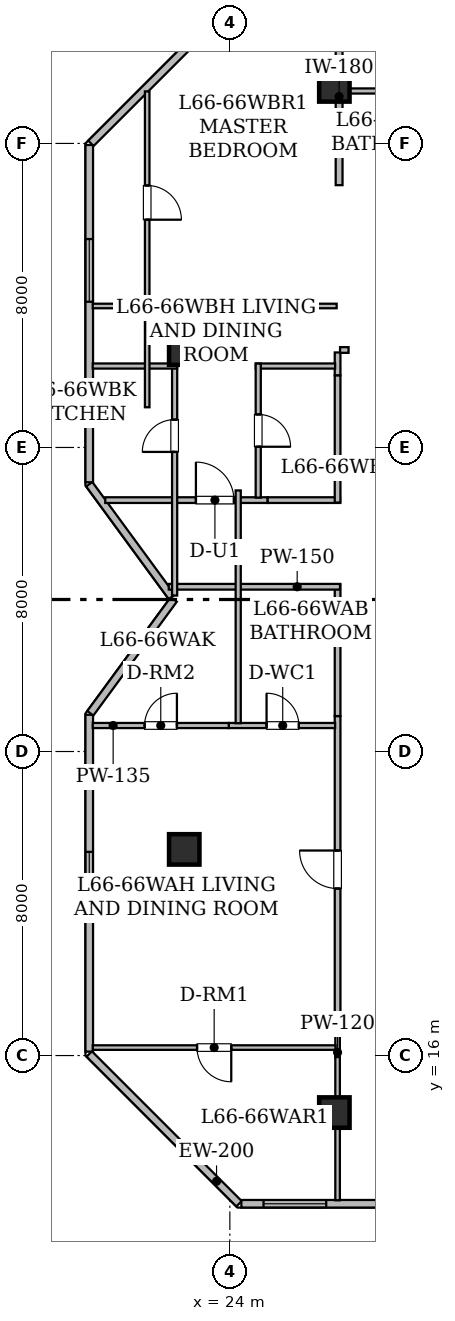
"""IFC4 building model, lengths in metres.
Left out: names, types, materials, properties, quantities, classifications, styles, units other than length and angle.
Written with IfcOpenShell. Run it as: python <this file> out.ifc"""

import sys

from ifc_helpers import new_model, si_unit, direction, frame, frame_2d, origin, origin_2d, place, context, subcontext, project, spatial, rectangle, hollow_rectangle, extrude, element, fill, save


model = new_model("IFC4")
c1 = context("Model", 3, precision=1e-05, world=origin(), true_north=direction((0.0, 1.0)))
c2 = subcontext(c1, "Body", "Model", "MODEL_VIEW")
j1 = project(units=[si_unit("LENGTHUNIT", "METRE"), si_unit("PLANEANGLEUNIT", "RADIAN")], contexts=[c1])
p1 = place(None, origin())
s1 = spatial("IfcSite", under=j1, at=p1, CompositionType="ELEMENT")
p2 = place(p1, origin())
s2 = spatial("IfcBuilding", under=s1, at=p2, CompositionType="ELEMENT")
p3 = place(p2, frame((0.0, 0.0, 257.35)))
s3 = spatial("IfcBuildingStorey", under=s2, at=p3, CompositionType="ELEMENT", Elevation=257.35)
for number, where, z_axis, x_axis in (
    (1, (26.75, 14.5, 0.0), (0.0, 0.0, 1.0), (1.0, 0.0, 0.0)),
    (2, (26.75, 41.5, 0.0), (0.0, 0.0, 1.0), (1.0, 0.0, 0.0)),
    (3, (22.8, 21.425, 0.0), (0.0, 0.0, 1.0), (1.0, 0.0, 0.0)),
    (4, (22.8, 34.575, 0.0), (0.0, 0.0, 1.0), (1.0, 0.0, 0.0)),
):
    element("IfcColumn", number, at=place(p3, frame(where, z_axis=z_axis, x_axis=x_axis)), inside=s3, PredefinedType="COLUMN", context=c2, shape_type="SweptSolid", body=[
        extrude(hollow_rectangle(XDim=0.8, YDim=0.8, WallThickness=0.04, at=origin_2d()), origin(), (0.0, 0.0, 1.0), 3.65),
    ])
p4 = place(p3, frame((24.241, 12.1, 0.0), z_axis=(0.0, 0.0, 1.0), x_axis=(-0.707106781187, 0.707106781187, 0.0)))
e5 = element("IfcWall", 5, at=p4, inside=s3, PredefinedType="STANDARD", context=c2, shape_type="SweptSolid", body=[
    extrude(rectangle(XDim=5.573, YDim=0.2, at=frame_2d((2.787, 0.0))), origin(), (0.0, 0.0, 1.0), 3.43),
])
p5 = place(p3, frame((20.3, 16.104, 0.0), z_axis=(0.0, 0.0, 1.0), x_axis=(0.0, 1.0, 0.0)))
e6 = element("IfcWall", 6, at=p5, inside=s3, PredefinedType="STANDARD", context=c2, shape_type="SweptSolid", body=[
    extrude(rectangle(XDim=8.863, YDim=0.2, at=frame_2d((4.432, 0.0))), origin(), (0.0, 0.0, 1.0), 3.43),
])
p6 = place(p5, frame((3.606, 0.0, 0.85)))
e7 = element("IfcOpeningElement", 7, at=p6, cuts=e6, PredefinedType="OPENING", context=c2, shape_type="SweptSolid", body=[
    extrude(rectangle(XDim=1.65, YDim=1.55, at=frame_2d((0.825, 0.775))), frame((0.0, 0.11, 0.0), z_axis=(0.0, -1.0, 0.0), x_axis=(1.0, 0.0, 0.0)), (0.0, 0.0, 1.0), 0.22),
])
p7 = place(p3, frame((20.329, 25.007, 0.0), z_axis=(0.0, 0.0, 1.0), x_axis=(0.591366515379, 0.806402904564, 0.0)))
e8 = element("IfcWall", 8, at=p7, inside=s3, PredefinedType="STANDARD", context=c2, shape_type="SweptSolid", body=[
    extrude(rectangle(XDim=3.711, YDim=0.2, at=frame_2d((1.856, 0.0))), origin(), (0.0, 0.0, 1.0), 3.43),
])
p8 = place(p3, frame((22.473, 28.069, 0.0), z_axis=(0.0, 0.0, 1.0), x_axis=(-0.591248456881, 0.80648946815, 0.0)))
e9 = element("IfcWall", 9, at=p8, inside=s3, PredefinedType="STANDARD", context=c2, shape_type="SweptSolid", body=[
    extrude(rectangle(XDim=3.675, YDim=0.2, at=frame_2d((1.837, 0.0))), origin(), (0.0, 0.0, 1.0), 3.43),
])
p9 = place(p3, frame((20.3, 31.084, 0.0), z_axis=(0.0, 0.0, 1.0), x_axis=(0.0, 1.0, 0.0)))
e10 = element("IfcWall", 10, at=p9, inside=s3, PredefinedType="STANDARD", context=c2, shape_type="SweptSolid", body=[
    extrude(rectangle(XDim=8.875, YDim=0.2, at=frame_2d((4.438, 0.0))), origin(), (0.0, 0.0, 1.0), 3.43),
])
p10 = place(p9, frame((4.75, 0.0, 0.85)))
e11 = element("IfcOpeningElement", 11, at=p10, cuts=e10, PredefinedType="OPENING", context=c2, shape_type="SweptSolid", body=[
    extrude(rectangle(XDim=1.65, YDim=1.55, at=frame_2d((0.825, 0.775))), frame((0.0, 0.11, 0.0), z_axis=(0.0, -1.0, 0.0), x_axis=(1.0, 0.0, 0.0)), (0.0, 0.0, 1.0), 0.22),
])
p11 = place(p3, frame((20.344, 40.003, 0.0), z_axis=(0.0, 0.0, 1.0), x_axis=(0.707106781187, 0.707106781187, 0.0)))
e12 = element("IfcWall", 12, at=p11, inside=s3, PredefinedType="STANDARD", context=c2, shape_type="SweptSolid", body=[
    extrude(rectangle(XDim=5.511, YDim=0.2, at=frame_2d((2.756, 0.0))), origin(), (0.0, 0.0, 1.0), 3.43),
])
p12 = place(p3, frame((65.696, 12.1, 0.0), z_axis=(0.0, 0.0, 1.0), x_axis=(-1.0, 0.0, 0.0)))
e13 = element("IfcWall", 13, at=p12, inside=s3, PredefinedType="STANDARD", context=c2, shape_type="SweptSolid", body=[
    extrude(rectangle(XDim=41.393, YDim=0.2, at=frame_2d((20.697, 0.0))), origin(), (0.0, 0.0, 1.0), 3.43),
])
p13 = place(p12, frame((33.821, 0.0, 0.85)))
e14 = element("IfcOpeningElement", 14, at=p13, cuts=e13, PredefinedType="OPENING", context=c2, shape_type="SweptSolid", body=[
    extrude(rectangle(XDim=1.65, YDim=1.55, at=frame_2d((0.825, 0.775))), frame((0.0, 0.11, 0.0), z_axis=(0.0, -1.0, 0.0), x_axis=(1.0, 0.0, 0.0)), (0.0, 0.0, 1.0), 0.22),
])
p14 = place(p12, frame((39.16, 0.0, 0.85)))
e15 = element("IfcOpeningElement", 15, at=p14, cuts=e13, PredefinedType="OPENING", context=c2, shape_type="SweptSolid", body=[
    extrude(rectangle(XDim=1.65, YDim=1.55, at=frame_2d((0.825, 0.775))), frame((0.0, 0.11, 0.0), z_axis=(0.0, -1.0, 0.0), x_axis=(1.0, 0.0, 0.0)), (0.0, 0.0, 1.0), 0.22),
])
p15 = place(p12, frame((17.006, 0.0, 0.8)))
e16 = element("IfcOpeningElement", 16, at=p15, cuts=e13, PredefinedType="OPENING", context=c2, shape_type="SweptSolid", body=[
    extrude(rectangle(XDim=1.2, YDim=1.5, at=frame_2d((0.6, 0.75))), frame((0.0, 0.11, 0.0), z_axis=(0.0, -1.0, 0.0), x_axis=(1.0, 0.0, 0.0)), (0.0, 0.0, 1.0), 0.22),
])
p16 = place(p12, frame((20.411, 0.0, 0.85)))
e17 = element("IfcOpeningElement", 17, at=p16, cuts=e13, PredefinedType="OPENING", context=c2, shape_type="SweptSolid", body=[
    extrude(rectangle(XDim=1.65, YDim=1.55, at=frame_2d((0.825, 0.775))), frame((0.0, 0.11, 0.0), z_axis=(0.0, -1.0, 0.0), x_axis=(1.0, 0.0, 0.0)), (0.0, 0.0, 1.0), 0.22),
])
p17 = place(p12, frame((13.151, 0.0, 0.85)))
e18 = element("IfcOpeningElement", 18, at=p17, cuts=e13, PredefinedType="OPENING", context=c2, shape_type="SweptSolid", body=[
    extrude(rectangle(XDim=1.65, YDim=1.55, at=frame_2d((0.825, 0.775))), frame((0.0, 0.11, 0.0), z_axis=(0.0, -1.0, 0.0), x_axis=(1.0, 0.0, 0.0)), (0.0, 0.0, 1.0), 0.22),
])
p18 = place(p12, frame((2.936, 0.0, 0.8)))
e19 = element("IfcOpeningElement", 19, at=p18, cuts=e13, PredefinedType="OPENING", context=c2, shape_type="SweptSolid", body=[
    extrude(rectangle(XDim=1.2, YDim=1.5, at=frame_2d((0.6, 0.75))), frame((0.0, 0.11, 0.0), z_axis=(0.0, -1.0, 0.0), x_axis=(1.0, 0.0, 0.0)), (0.0, 0.0, 1.0), 0.22),
])
p19 = place(p12, frame((6.901, 0.0, 0.85)))
e20 = element("IfcOpeningElement", 20, at=p19, cuts=e13, PredefinedType="OPENING", context=c2, shape_type="SweptSolid", body=[
    extrude(rectangle(XDim=1.65, YDim=1.55, at=frame_2d((0.825, 0.775))), frame((0.0, 0.11, 0.0), z_axis=(0.0, -1.0, 0.0), x_axis=(1.0, 0.0, 0.0)), (0.0, 0.0, 1.0), 0.22),
])
p20 = place(p12, frame((0.693, 0.0, 0.85)))
e21 = element("IfcOpeningElement", 21, at=p20, cuts=e13, PredefinedType="OPENING", context=c2, shape_type="SweptSolid", body=[
    extrude(rectangle(XDim=1.65, YDim=1.55, at=frame_2d((0.825, 0.775))), frame((0.0, 0.11, 0.0), z_axis=(0.0, -1.0, 0.0), x_axis=(1.0, 0.0, 0.0)), (0.0, 0.0, 1.0), 0.22),
])
p21 = place(p3, frame((35.514, 16.835, 0.0), z_axis=(0.0, 0.0, 1.0), x_axis=(-1.0, 0.0, 0.0)))
e22 = element("IfcWall", 22, at=p21, inside=s3, PredefinedType="STANDARD", context=c2, shape_type="SweptSolid", body=[
    extrude(rectangle(XDim=8.614, YDim=0.15, at=frame_2d((4.307, 0.0))), origin(), (0.0, 0.0, 1.0), 2.725),
])
p22 = place(p21, frame((3.753, 0.0, 0.0)))
e23 = element("IfcOpeningElement", 23, at=p22, cuts=e22, PredefinedType="OPENING", context=c2, shape_type="SweptSolid", body=[
    extrude(rectangle(XDim=1.15, YDim=2.2, at=frame_2d((0.575, 1.1))), frame((0.0, 0.085, 0.0), z_axis=(0.0, -1.0, 0.0), x_axis=(1.0, 0.0, 0.0)), (0.0, 0.0, 1.0), 0.17),
])
p23 = place(p3, frame((26.835, 16.9, 0.0), z_axis=(0.0, 0.0, 1.0), x_axis=(0.0, 1.0, 0.0)))
e24 = element("IfcWall", 24, at=p23, inside=s3, PredefinedType="STANDARD", context=c2, shape_type="SweptSolid", body=[
    extrude(rectangle(XDim=8.033, YDim=0.15, at=frame_2d((4.017, 0.0))), origin(), (0.0, 0.0, 1.0), 2.725),
])
p24 = place(p23, frame((3.495, 0.0, 0.0)))
e25 = element("IfcOpeningElement", 25, at=p24, cuts=e24, PredefinedType="OPENING", context=c2, shape_type="SweptSolid", body=[
    extrude(rectangle(XDim=1.0, YDim=2.15, at=frame_2d((0.5, 1.075))), frame((0.0, 0.085, 0.0), z_axis=(0.0, -1.0, 0.0), x_axis=(1.0, 0.0, 0.0)), (0.0, 0.0, 1.0), 0.17),
])
p25 = place(p3, frame((26.835, 24.933, 0.0), z_axis=(0.0, 0.0, 1.0), x_axis=(0.0, 1.0, 0.0)))
e26 = element("IfcWall", 26, at=p25, inside=s3, PredefinedType="STANDARD", context=c2, shape_type="SweptSolid", body=[
    extrude(rectangle(XDim=3.467, YDim=0.15, at=frame_2d((1.733, 0.0))), origin(), (0.0, 0.0, 1.0), 3.43),
])
p26 = place(p3, frame((26.898, 28.335, 0.0), z_axis=(0.0, 0.0, 1.0), x_axis=(-1.0, 0.0, 0.0)))
e27 = element("IfcWall", 27, at=p26, inside=s3, PredefinedType="STANDARD", context=c2, shape_type="SweptSolid", body=[
    extrude(rectangle(XDim=4.506, YDim=0.15, at=frame_2d((2.253, 0.0))), origin(), (0.0, 0.0, 1.0), 2.887),
])
p27 = place(p3, frame((20.721, 30.615, 0.0), z_axis=(0.0, 0.0, 1.0), x_axis=(1.0, 0.0, 0.0)))
e28 = element("IfcWall", 28, at=p27, inside=s3, PredefinedType="STANDARD", context=c2, shape_type="SweptSolid", body=[
    extrude(rectangle(XDim=4.275, YDim=0.15, at=frame_2d((2.138, 0.0))), origin(), (0.0, 0.0, 1.0), 2.887),
])
p28 = place(p27, frame((2.386, 0.0, 0.0)))
e29 = element("IfcOpeningElement", 29, at=p28, cuts=e28, PredefinedType="OPENING", context=c2, shape_type="SweptSolid", body=[
    extrude(rectangle(XDim=1.0, YDim=2.15, at=frame_2d((0.5, 1.075))), frame((0.0, 0.085, 0.0), z_axis=(0.0, -1.0, 0.0), x_axis=(1.0, 0.0, 0.0)), (0.0, 0.0, 1.0), 0.17),
])
p29 = place(p3, frame((26.835, 33.894, 0.0), z_axis=(0.0, 0.0, 1.0), x_axis=(0.0, 1.0, 0.0)))
e30 = element("IfcWall", 30, at=p29, inside=s3, PredefinedType="STANDARD", context=c2, shape_type="SweptSolid", body=[
    extrude(rectangle(XDim=0.606, YDim=0.15, at=frame_2d((0.303, 0.0))), origin(), (0.0, 0.0, 1.0), 2.687),
])
p30 = place(p3, frame((26.9, 34.565, 0.0), z_axis=(0.0, 0.0, 1.0), x_axis=(1.0, 0.0, 0.0)))
e31 = element("IfcWall", 31, at=p30, inside=s3, PredefinedType="STANDARD", context=c2, shape_type="SweptSolid", body=[
    extrude(rectangle(XDim=0.224, YDim=0.15, at=frame_2d((0.112, 0.0))), origin(), (0.0, 0.0, 1.0), 2.687),
])
p31 = place(p3, frame((24.996, 30.615, 0.0), z_axis=(0.0, 0.0, 1.0), x_axis=(1.0, 0.0, 0.0)))
e32 = element("IfcWall", 32, at=p31, inside=s3, PredefinedType="STANDARD", context=c2, shape_type="SweptSolid", body=[
    extrude(rectangle(XDim=1.904, YDim=0.15, at=frame_2d((0.952, 0.0))), origin(), (0.0, 0.0, 1.0), 3.43),
])
p32 = place(p3, frame((26.835, 30.552, 0.0), z_axis=(0.0, 0.0, 1.0), x_axis=(0.0, 1.0, 0.0)))
e33 = element("IfcWall", 33, at=p32, inside=s3, PredefinedType="STANDARD", context=c2, shape_type="SweptSolid", body=[
    extrude(rectangle(XDim=3.342, YDim=0.15, at=frame_2d((1.671, 0.0))), origin(), (0.0, 0.0, 1.0), 2.687),
])
p33 = place(p3, frame((26.835, 15.961, 0.0), z_axis=(0.0, 0.0, 1.0), x_axis=(0.0, 1.0, 0.0)))
e34 = element("IfcWall", 34, at=p33, inside=s3, PredefinedType="PARTITIONING", context=c2, shape_type="SweptSolid", body=[
    extrude(rectangle(XDim=0.809, YDim=0.12, at=frame_2d((0.405, 0.0))), origin(), (0.0, 0.0, 1.0), 3.43),
])
p34 = place(p3, frame((26.835, 12.192, 0.0), z_axis=(0.0, 0.0, 1.0), x_axis=(0.0, 1.0, 0.0)))
e35 = element("IfcWall", 35, at=p34, inside=s3, PredefinedType="PARTITIONING", context=c2, shape_type="SweptSolid", body=[
    extrude(rectangle(XDim=3.769, YDim=0.12, at=frame_2d((1.885, 0.0))), origin(), (0.0, 0.0, 1.0), 2.725),
])
p35 = place(p3, frame((23.971, 24.684, 0.0), z_axis=(0.0, 0.0, 1.0), x_axis=(1.0, 0.0, 0.0)))
e36 = element("IfcWall", 36, at=p35, inside=s3, PredefinedType="PARTITIONING", context=c2, shape_type="SweptSolid", body=[
    extrude(rectangle(XDim=2.799, YDim=0.135, at=frame_2d((1.399, 0.0))), origin(), (0.0, 0.0, 1.0), 3.43),
])
p36 = place(p35, frame((0.995, 0.0, 0.0)))
e37 = element("IfcOpeningElement", 37, at=p36, cuts=e36, PredefinedType="OPENING", context=c2, shape_type="SweptSolid", body=[
    extrude(rectangle(XDim=0.85, YDim=2.1, at=frame_2d((0.425, 1.05))), frame((0.0, 0.077, 0.0), z_axis=(0.0, -1.0, 0.0), x_axis=(1.0, 0.0, 0.0)), (0.0, 0.0, 1.0), 0.155),
])
p37 = place(p3, frame((20.392, 24.684, 0.0), z_axis=(0.0, 0.0, 1.0), x_axis=(1.0, 0.0, 0.0)))
e38 = element("IfcWall", 38, at=p37, inside=s3, PredefinedType="PARTITIONING", context=c2, shape_type="SweptSolid", body=[
    extrude(rectangle(XDim=3.579, YDim=0.135, at=frame_2d((1.79, 0.0))), origin(), (0.0, 0.0, 1.0), 2.887),
])
p38 = place(p37, frame((1.365, 0.0, 0.0)))
e39 = element("IfcOpeningElement", 39, at=p38, cuts=e38, PredefinedType="OPENING", context=c2, shape_type="SweptSolid", body=[
    extrude(rectangle(XDim=0.85, YDim=2.1, at=frame_2d((0.425, 1.05))), frame((0.0, 0.077, 0.0), z_axis=(0.0, -1.0, 0.0), x_axis=(1.0, 0.0, 0.0)), (0.0, 0.0, 1.0), 0.155),
])
p39 = place(p3, frame((26.781, 16.21, 0.0), z_axis=(0.0, 0.0, 1.0), x_axis=(-1.0, 0.0, 0.0)))
e40 = element("IfcWall", 40, at=p39, inside=s3, PredefinedType="PARTITIONING", context=c2, shape_type="SweptSolid", body=[
    extrude(rectangle(XDim=6.389, YDim=0.12, at=frame_2d((3.194, 0.0))), origin(), (0.0, 0.0, 1.0), 2.887),
])
p40 = place(p39, frame((2.744, 0.0, 0.0)))
e41 = element("IfcOpeningElement", 41, at=p40, cuts=e40, PredefinedType="OPENING", context=c2, shape_type="SweptSolid", body=[
    extrude(rectangle(XDim=0.9, YDim=2.1, at=frame_2d((0.45, 1.05))), frame((0.0, 0.07, 0.0), z_axis=(0.0, -1.0, 0.0), x_axis=(1.0, 0.0, 0.0)), (0.0, 0.0, 1.0), 0.14),
])
p41 = place(p3, frame((24.22, 24.745, 0.0), z_axis=(0.0, 0.0, 1.0), x_axis=(0.0, 1.0, 0.0)))
e42 = element("IfcWall", 42, at=p41, inside=s3, PredefinedType="PARTITIONING", context=c2, shape_type="SweptSolid", body=[
    extrude(rectangle(XDim=6.125, YDim=0.135, at=frame_2d((3.062, 0.0))), origin(), (0.0, 0.0, 1.0), 3.43),
])
p42 = place(p3, frame((26.77, 34.143, 0.0), z_axis=(0.0, 0.0, 1.0), x_axis=(-1.0, 0.0, 0.0)))
e43 = element("IfcWall", 43, at=p42, inside=s3, PredefinedType="PARTITIONING", context=c2, shape_type="SweptSolid", body=[
    extrude(rectangle(XDim=2.088, YDim=0.135, at=frame_2d((1.044, 0.0))), origin(), (0.0, 0.0, 1.0), 2.687),
])
p43 = place(p3, frame((24.747, 34.208, 0.0), z_axis=(0.0, 0.0, 1.0), x_axis=(0.0, -1.0, 0.0)))
e44 = element("IfcWall", 44, at=p43, inside=s3, PredefinedType="PARTITIONING", context=c2, shape_type="SweptSolid", body=[
    extrude(rectangle(XDim=3.528, YDim=0.135, at=frame_2d((1.764, 0.0))), origin(), (0.0, 0.0, 1.0), 2.687),
])
p44 = place(p43, frame((1.339, 0.0, 0.0)))
e45 = element("IfcOpeningElement", 45, at=p44, cuts=e44, PredefinedType="OPENING", context=c2, shape_type="SweptSolid", body=[
    extrude(rectangle(XDim=0.85, YDim=2.1, at=frame_2d((0.425, 1.05))), frame((0.0, 0.077, 0.0), z_axis=(0.0, -1.0, 0.0), x_axis=(1.0, 0.0, 0.0)), (0.0, 0.0, 1.0), 0.155),
])
p45 = place(p3, frame((22.547, 28.104, 0.0), z_axis=(0.0, 0.0, 1.0), x_axis=(0.0, 1.0, 0.0)))
e46 = element("IfcWall", 46, at=p45, inside=s3, PredefinedType="PARTITIONING", context=c2, shape_type="SweptSolid", body=[
    extrude(rectangle(XDim=6.104, YDim=0.135, at=frame_2d((3.052, 0.0))), origin(), (0.0, 0.0, 1.0), 2.687),
])
p46 = place(p45, frame((3.779, 0.0, 0.0)))
e47 = element("IfcOpeningElement", 47, at=p46, cuts=e46, PredefinedType="OPENING", context=c2, shape_type="SweptSolid", body=[
    extrude(rectangle(XDim=0.85, YDim=2.1, at=frame_2d((0.425, 1.05))), frame((0.0, 0.077, 0.0), z_axis=(0.0, -1.0, 0.0), x_axis=(1.0, 0.0, 0.0)), (0.0, 0.0, 1.0), 0.155),
])
p47 = place(p3, frame((22.612, 34.143, 0.0), z_axis=(0.0, 0.0, 1.0), x_axis=(-1.0, 0.0, 0.0)))
e48 = element("IfcWall", 48, at=p47, inside=s3, PredefinedType="PARTITIONING", context=c2, shape_type="SweptSolid", body=[
    extrude(rectangle(XDim=2.22, YDim=0.135, at=frame_2d((1.11, 0.0))), origin(), (0.0, 0.0, 1.0), 2.687),
])
p48 = place(p3, frame((21.825, 41.369, 0.0), z_axis=(0.0, 0.0, 1.0), x_axis=(0.0, -1.0, 0.0)))
e49 = element("IfcWall", 49, at=p48, inside=s3, PredefinedType="PARTITIONING", context=c2, shape_type="SweptSolid", body=[
    extrude(rectangle(XDim=8.311, YDim=0.12, at=frame_2d((4.155, 0.0))), origin(), (0.0, 0.0, 1.0), 2.687),
])
p49 = place(p48, frame((2.476, 0.0, 0.0)))
e50 = element("IfcOpeningElement", 50, at=p49, cuts=e49, PredefinedType="OPENING", context=c2, shape_type="SweptSolid", body=[
    extrude(rectangle(XDim=0.9, YDim=2.1, at=frame_2d((0.45, 1.05))), frame((0.0, 0.07, 0.0), z_axis=(0.0, -1.0, 0.0), x_axis=(1.0, 0.0, 0.0)), (0.0, 0.0, 1.0), 0.14),
])
p50 = place(p3, frame((20.392, 35.723, 0.0), z_axis=(0.0, 0.0, 1.0), x_axis=(1.0, 0.0, 0.0)))
e51 = element("IfcWall", 51, at=p50, inside=s3, PredefinedType="PARTITIONING", context=c2, shape_type="SweptSolid", body=[
    extrude(rectangle(XDim=6.418, YDim=0.12, at=frame_2d((3.209, 0.0))), origin(), (0.0, 0.0, 1.0), 2.725),
])
p51 = place(p3, frame((26.875, 41.643, 0.0), z_axis=(0.0, 0.0, 1.0), x_axis=(0.0, -1.0, 0.0)))
e52 = element("IfcWall", 52, at=p51, inside=s3, PredefinedType="STANDARD", context=c2, shape_type="SweptSolid", body=[
    extrude(rectangle(XDim=2.741, YDim=0.18, at=frame_2d((1.371, 0.0))), origin(), (0.0, 0.0, 1.0), 2.725),
])
p52 = place(p3, frame((26.875, 43.808, 0.0), z_axis=(0.0, 0.0, 1.0), x_axis=(0.0, -1.0, 0.0)))
e53 = element("IfcWall", 53, at=p52, inside=s3, PredefinedType="STANDARD", context=c2, shape_type="SweptSolid", body=[
    extrude(rectangle(XDim=2.165, YDim=0.18, at=frame_2d((1.083, 0.0))), origin(), (0.0, 0.0, 1.0), 2.725),
])
p53 = place(p3, frame((26.957, 41.38, 0.0), z_axis=(0.0, 0.0, 1.0), x_axis=(1.0, 0.0, 0.0)))
e54 = element("IfcWall", 54, at=p53, inside=s3, PredefinedType="PARTITIONING", context=c2, shape_type="SweptSolid", body=[
    extrude(rectangle(XDim=3.982, YDim=0.135, at=frame_2d((1.991, 0.0))), origin(), (0.0, 0.0, 1.0), 2.725),
])
p54 = place(p6, origin())
e55 = element("IfcWindow", 55, at=p54, inside=s3, PartitioningType="SINGLE_PANEL", PredefinedType="WINDOW", context=c2, shape_type="SweptSolid", body=[
    extrude(rectangle(XDim=1.65, YDim=1.55, at=frame_2d((0.825, 0.775))), frame((0.0, 0.03, 0.0), z_axis=(0.0, -1.0, 0.0), x_axis=(1.0, 0.0, 0.0)), (0.0, 0.0, 1.0), 0.06),
])
fill(e7, e55)
p55 = place(p14, origin())
e56 = element("IfcWindow", 56, at=p55, inside=s3, PartitioningType="SINGLE_PANEL", PredefinedType="WINDOW", context=c2, shape_type="SweptSolid", body=[
    extrude(rectangle(XDim=1.65, YDim=1.55, at=frame_2d((0.825, 0.775))), frame((0.0, 0.03, 0.0), z_axis=(0.0, -1.0, 0.0), x_axis=(1.0, 0.0, 0.0)), (0.0, 0.0, 1.0), 0.06),
])
fill(e15, e56)
p56 = place(p10, origin())
e57 = element("IfcWindow", 57, at=p56, inside=s3, PartitioningType="SINGLE_PANEL", PredefinedType="WINDOW", context=c2, shape_type="SweptSolid", body=[
    extrude(rectangle(XDim=1.65, YDim=1.55, at=frame_2d((0.825, 0.775))), frame((0.0, 0.03, 0.0), z_axis=(0.0, -1.0, 0.0), x_axis=(1.0, 0.0, 0.0)), (0.0, 0.0, 1.0), 0.06),
])
fill(e11, e57)
p57 = place(p24, origin())
e58 = element("IfcDoor", 58, at=p57, inside=s3, OperationType="SINGLE_SWING_RIGHT", PredefinedType="DOOR", context=c2, shape_type="SweptSolid", body=[
    extrude(rectangle(XDim=1.0, YDim=2.15, at=frame_2d((0.5, 1.075))), frame((0.0, 0.025, 0.0), z_axis=(0.0, -1.0, 0.0), x_axis=(1.0, 0.0, 0.0)), (0.0, 0.0, 1.0), 0.05),
])
fill(e25, e58)
p58 = place(p28, origin())
e59 = element("IfcDoor", 59, at=p58, inside=s3, OperationType="SINGLE_SWING_LEFT", PredefinedType="DOOR", context=c2, shape_type="SweptSolid", body=[
    extrude(rectangle(XDim=1.0, YDim=2.15, at=frame_2d((0.5, 1.075))), frame((0.0, 0.025, 0.0), z_axis=(0.0, -1.0, 0.0), x_axis=(1.0, 0.0, 0.0)), (0.0, 0.0, 1.0), 0.05),
])
fill(e29, e59)
p59 = place(p36, origin())
e60 = element("IfcDoor", 60, at=p59, inside=s3, OperationType="SINGLE_SWING_LEFT", PredefinedType="DOOR", context=c2, shape_type="SweptSolid", body=[
    extrude(rectangle(XDim=0.85, YDim=2.1, at=frame_2d((0.425, 1.05))), frame((0.0, 0.025, 0.0), z_axis=(0.0, -1.0, 0.0), x_axis=(1.0, 0.0, 0.0)), (0.0, 0.0, 1.0), 0.05),
])
fill(e37, e60)
p60 = place(p38, origin())
e61 = element("IfcDoor", 61, at=p60, inside=s3, OperationType="SINGLE_SWING_RIGHT", PredefinedType="DOOR", context=c2, shape_type="SweptSolid", body=[
    extrude(rectangle(XDim=0.85, YDim=2.1, at=frame_2d((0.425, 1.05))), frame((0.0, 0.025, 0.0), z_axis=(0.0, -1.0, 0.0), x_axis=(1.0, 0.0, 0.0)), (0.0, 0.0, 1.0), 0.05),
])
fill(e39, e61)
p61 = place(p40, origin())
e62 = element("IfcDoor", 62, at=p61, inside=s3, OperationType="SINGLE_SWING_LEFT", PredefinedType="DOOR", context=c2, shape_type="SweptSolid", body=[
    extrude(rectangle(XDim=0.9, YDim=2.1, at=frame_2d((0.45, 1.05))), frame((0.0, 0.025, 0.0), z_axis=(0.0, -1.0, 0.0), x_axis=(1.0, 0.0, 0.0)), (0.0, 0.0, 1.0), 0.05),
])
fill(e41, e62)
p62 = place(p44, origin())
e63 = element("IfcDoor", 63, at=p62, inside=s3, OperationType="SINGLE_SWING_RIGHT", PredefinedType="DOOR", context=c2, shape_type="SweptSolid", body=[
    extrude(rectangle(XDim=0.85, YDim=2.1, at=frame_2d((0.425, 1.05))), frame((0.0, 0.025, 0.0), z_axis=(0.0, -1.0, 0.0), x_axis=(1.0, 0.0, 0.0)), (0.0, 0.0, 1.0), 0.05),
])
fill(e45, e63)
p63 = place(p46, origin())
e64 = element("IfcDoor", 64, at=p63, inside=s3, OperationType="SINGLE_SWING_LEFT", PredefinedType="DOOR", context=c2, shape_type="SweptSolid", body=[
    extrude(rectangle(XDim=0.85, YDim=2.1, at=frame_2d((0.425, 1.05))), frame((0.0, 0.025, 0.0), z_axis=(0.0, -1.0, 0.0), x_axis=(1.0, 0.0, 0.0)), (0.0, 0.0, 1.0), 0.05),
])
fill(e47, e64)
p64 = place(p49, origin())
e65 = element("IfcDoor", 65, at=p64, inside=s3, OperationType="SINGLE_SWING_RIGHT", PredefinedType="DOOR", context=c2, shape_type="SweptSolid", body=[
    extrude(rectangle(XDim=0.9, YDim=2.1, at=frame_2d((0.45, 1.05))), frame((0.0, 0.025, 0.0), z_axis=(0.0, -1.0, 0.0), x_axis=(1.0, 0.0, 0.0)), (0.0, 0.0, 1.0), 0.05),
])
fill(e50, e65)
save(model, sys.argv[1])
